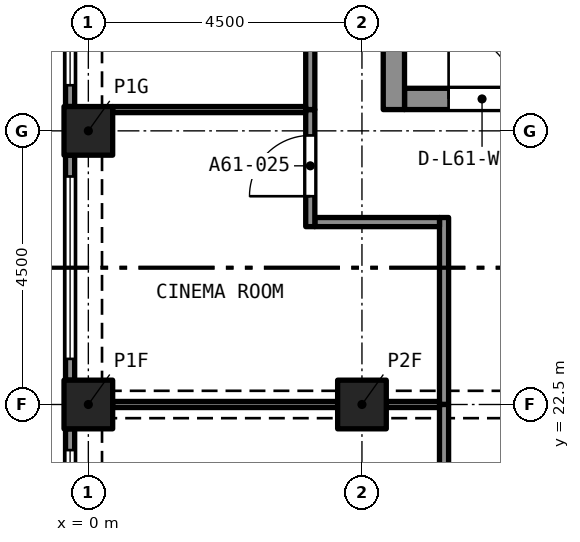
"""IFC4 building model, lengths in metres.
Left out: names, types, materials, properties, quantities, classifications, styles, units other than length and angle.
Written with IfcOpenShell. Run it as: python <this file> out.ifc"""

import sys

from ifc_helpers import new_model, si_unit, direction, frame, frame_2d, origin, origin_2d, place, context, subcontext, project, spatial, rectangle, extrude, element, fill, save


model = new_model("IFC4")
c1 = context("Model", 3, precision=1e-05, world=origin(), true_north=direction((0.0, 1.0)))
c2 = subcontext(c1, "Body", "Model", "MODEL_VIEW")
j1 = project(units=[si_unit("LENGTHUNIT", "METRE"), si_unit("PLANEANGLEUNIT", "RADIAN")], contexts=[c1])
p1 = place(None, origin())
s1 = spatial("IfcSite", under=j1, at=p1, CompositionType="ELEMENT")
p2 = place(p1, origin())
s2 = spatial("IfcBuilding", under=s1, at=p2, CompositionType="ELEMENT")
p3 = place(p2, frame((0.0, 0.0, 219.695)))
s3 = spatial("IfcBuildingStorey", under=s2, at=p3, CompositionType="ELEMENT", Elevation=219.695)
for number, where, z_axis, x_axis in (
    (1, (0.0, 22.5, 0.0), (0.0, 0.0, 1.0), (1.0, 0.0, 0.0)),
    (2, (4.5, 22.5, 0.0), (0.0, 0.0, 1.0), (1.0, 0.0, 0.0)),
    (3, (0.0, 27.0, 0.0), (0.0, 0.0, 1.0), (1.0, 0.0, 0.0)),
):
    element("IfcColumn", number, at=place(p3, frame(where, z_axis=z_axis, x_axis=x_axis)), inside=s3, PredefinedType="COLUMN", context=c2, shape_type="SweptSolid", body=[
        extrude(rectangle(XDim=0.8, YDim=0.8, at=origin_2d()), origin(), (0.0, 0.0, 1.0), 3.2),
    ])
p4 = place(p3, frame((5.2, 27.525, 0.0), z_axis=(0.0, 0.0, 1.0), x_axis=(1.0, 0.0, 0.0)))
e4 = element("IfcWall", 4, at=p4, inside=s3, PredefinedType="SOLIDWALL", context=c2, shape_type="SweptSolid", body=[
    extrude(rectangle(XDim=7.6, YDim=0.35, at=frame_2d((3.8, 0.0))), origin(), (0.0, 0.0, 1.0), 3.2),
])
p5 = place(p4, frame((0.725, 0.0, 0.0)))
e5 = element("IfcOpeningElement", 5, at=p5, cuts=e4, PredefinedType="OPENING", context=c2, shape_type="SweptSolid", body=[
    extrude(rectangle(XDim=1.1, YDim=2.1, at=frame_2d((0.55, 1.05))), frame((0.0, 0.185, 0.0), z_axis=(0.0, -1.0, 0.0), x_axis=(1.0, 0.0, 0.0)), (0.0, 0.0, 1.0), 0.37),
])
p6 = place(p4, frame((3.25, 0.0, 0.0)))
e6 = element("IfcOpeningElement", 6, at=p6, cuts=e4, PredefinedType="OPENING", context=c2, shape_type="SweptSolid", body=[
    extrude(rectangle(XDim=1.1, YDim=2.1, at=frame_2d((0.55, 1.05))), frame((0.0, 0.185, 0.0), z_axis=(0.0, -1.0, 0.0), x_axis=(1.0, 0.0, 0.0)), (0.0, 0.0, 1.0), 0.37),
])
p7 = place(p4, frame((5.775, 0.0, 0.0)))
e7 = element("IfcOpeningElement", 7, at=p7, cuts=e4, PredefinedType="OPENING", context=c2, shape_type="SweptSolid", body=[
    extrude(rectangle(XDim=1.1, YDim=2.1, at=frame_2d((0.55, 1.05))), frame((0.0, 0.185, 0.0), z_axis=(0.0, -1.0, 0.0), x_axis=(1.0, 0.0, 0.0)), (0.0, 0.0, 1.0), 0.37),
])
p8 = place(p3, frame((5.025, 27.35, 0.0), z_axis=(0.0, 0.0, 1.0), x_axis=(0.0, 1.0, 0.0)))
e8 = element("IfcWall", 8, at=p8, inside=s3, PredefinedType="SOLIDWALL", context=c2, shape_type="SweptSolid", body=[
    extrude(rectangle(XDim=12.8, YDim=0.35, at=frame_2d((6.4, 0.0))), origin(), (0.0, 0.0, 1.0), 3.2),
])
p9 = place(p8, frame((8.6, 0.0, 0.0)))
e9 = element("IfcOpeningElement", 9, at=p9, cuts=e8, PredefinedType="OPENING", context=c2, shape_type="SweptSolid", body=[
    extrude(rectangle(XDim=1.2, YDim=2.1, at=frame_2d((0.6, 1.05))), frame((0.0, 0.185, 0.0), z_axis=(0.0, -1.0, 0.0), x_axis=(1.0, 0.0, 0.0)), (0.0, 0.0, 1.0), 0.37),
])
p10 = place(p3, frame((-0.3, 27.4, 0.0), z_axis=(0.0, 0.0, 1.0), x_axis=(0.0, 1.0, 0.0)))
e10 = element("IfcWall", 10, at=p10, inside=s3, PredefinedType="SOLIDWALL", context=c2, shape_type="SweptSolid", body=[
    extrude(rectangle(XDim=3.7, YDim=0.15, at=frame_2d((1.85, 0.0))), origin(), (0.0, 0.0, 1.0), 3.2),
])
p11 = place(p10, frame((0.35, 0.0, 0.45)))
e11 = element("IfcOpeningElement", 11, at=p11, cuts=e10, PredefinedType="OPENING", context=c2, shape_type="SweptSolid", body=[
    extrude(rectangle(XDim=3.0, YDim=1.95, at=frame_2d((1.5, 0.975))), frame((0.0, 0.085, 0.0), z_axis=(0.0, -1.0, 0.0), x_axis=(1.0, 0.0, 0.0)), (0.0, 0.0, 1.0), 0.17),
])
p12 = place(p3, frame((-0.3, 22.9, 0.0), z_axis=(0.0, 0.0, 1.0), x_axis=(0.0, 1.0, 0.0)))
e12 = element("IfcWall", 12, at=p12, inside=s3, PredefinedType="SOLIDWALL", context=c2, shape_type="SweptSolid", body=[
    extrude(rectangle(XDim=3.7, YDim=0.15, at=frame_2d((1.85, 0.0))), origin(), (0.0, 0.0, 1.0), 3.2),
])
p13 = place(p12, frame((0.35, 0.0, 0.45)))
e13 = element("IfcOpeningElement", 13, at=p13, cuts=e12, PredefinedType="OPENING", context=c2, shape_type="SweptSolid", body=[
    extrude(rectangle(XDim=3.0, YDim=1.95, at=frame_2d((1.5, 0.975))), frame((0.0, 0.085, 0.0), z_axis=(0.0, -1.0, 0.0), x_axis=(1.0, 0.0, 0.0)), (0.0, 0.0, 1.0), 0.17),
])
p14 = place(p3, frame((-0.3, 18.4, 0.0), z_axis=(0.0, 0.0, 1.0), x_axis=(0.0, 1.0, 0.0)))
e14 = element("IfcWall", 14, at=p14, inside=s3, PredefinedType="SOLIDWALL", context=c2, shape_type="SweptSolid", body=[
    extrude(rectangle(XDim=3.7, YDim=0.15, at=frame_2d((1.85, 0.0))), origin(), (0.0, 0.0, 1.0), 3.2),
])
p15 = place(p14, frame((0.35, 0.0, 0.45)))
e15 = element("IfcOpeningElement", 15, at=p15, cuts=e14, PredefinedType="OPENING", context=c2, shape_type="SweptSolid", body=[
    extrude(rectangle(XDim=3.0, YDim=1.95, at=frame_2d((1.5, 0.975))), frame((0.0, 0.085, 0.0), z_axis=(0.0, -1.0, 0.0), x_axis=(1.0, 0.0, 0.0)), (0.0, 0.0, 1.0), 0.17),
])
p16 = place(p3, frame((5.85, 22.5, 0.0), z_axis=(0.0, 0.0, 1.0), x_axis=(0.0, 1.0, 0.0)))
e16 = element("IfcWall", 16, at=p16, inside=s3, PredefinedType="PARTITIONING", context=c2, shape_type="SweptSolid", body=[
    extrude(rectangle(XDim=3.075, YDim=0.15, at=frame_2d((1.538, 0.0))), origin(), (0.0, 0.0, 1.0), 2.9),
])
p17 = place(p3, frame((3.725, 25.5, 0.0), z_axis=(0.0, 0.0, 1.0), x_axis=(1.0, 0.0, 0.0)))
e17 = element("IfcWall", 17, at=p17, inside=s3, PredefinedType="PARTITIONING", context=c2, shape_type="SweptSolid", body=[
    extrude(rectangle(XDim=2.05, YDim=0.15, at=frame_2d((1.025, 0.0))), origin(), (0.0, 0.0, 1.0), 2.9),
])
p18 = place(p3, frame((3.65, 25.425, 0.0), z_axis=(0.0, 0.0, 1.0), x_axis=(0.0, 1.0, 0.0)))
e18 = element("IfcWall", 18, at=p18, inside=s3, PredefinedType="PARTITIONING", context=c2, shape_type="SweptSolid", body=[
    extrude(rectangle(XDim=1.925, YDim=0.15, at=frame_2d((0.962, 0.0))), origin(), (0.0, 0.0, 1.0), 2.9),
])
p19 = place(p18, frame((0.5, 0.0, 0.0)))
e19 = element("IfcOpeningElement", 19, at=p19, cuts=e18, PredefinedType="OPENING", context=c2, shape_type="SweptSolid", body=[
    extrude(rectangle(XDim=1.0, YDim=2.1, at=frame_2d((0.5, 1.05))), frame((0.0, 0.085, 0.0), z_axis=(0.0, -1.0, 0.0), x_axis=(1.0, 0.0, 0.0)), (0.0, 0.0, 1.0), 0.17),
])
p20 = place(p3, frame((3.65, 27.35, 0.0), z_axis=(0.0, 0.0, 1.0), x_axis=(0.0, 1.0, 0.0)))
e20 = element("IfcWall", 20, at=p20, inside=s3, PredefinedType="PARTITIONING", context=c2, shape_type="SweptSolid", body=[
    extrude(rectangle(XDim=4.15, YDim=0.15, at=frame_2d((2.075, 0.0))), origin(), (0.0, 0.0, 1.0), 2.9),
])
p21 = place(p20, frame((1.575, 0.0, 0.0)))
e21 = element("IfcOpeningElement", 21, at=p21, cuts=e20, PredefinedType="OPENING", context=c2, shape_type="SweptSolid", body=[
    extrude(rectangle(XDim=1.0, YDim=2.1, at=frame_2d((0.5, 1.05))), frame((0.0, 0.085, 0.0), z_axis=(0.0, -1.0, 0.0), x_axis=(1.0, 0.0, 0.0)), (0.0, 0.0, 1.0), 0.17),
])
p22 = place(p3, frame((5.85, 13.025, 0.0), z_axis=(0.0, 0.0, 1.0), x_axis=(0.0, 1.0, 0.0)))
e22 = element("IfcWall", 22, at=p22, inside=s3, PredefinedType="PARTITIONING", context=c2, shape_type="SweptSolid", body=[
    extrude(rectangle(XDim=9.475, YDim=0.15, at=frame_2d((4.738, 0.0))), origin(), (0.0, 0.0, 1.0), 2.9),
])
p23 = place(p22, frame((4.275, 0.0, 0.0)))
e23 = element("IfcOpeningElement", 23, at=p23, cuts=e22, PredefinedType="OPENING", context=c2, shape_type="SweptSolid", body=[
    extrude(rectangle(XDim=1.0, YDim=2.1, at=frame_2d((0.5, 1.05))), frame((0.0, 0.085, 0.0), z_axis=(0.0, -1.0, 0.0), x_axis=(1.0, 0.0, 0.0)), (0.0, 0.0, 1.0), 0.17),
])
p24 = place(p3, frame((0.4, 27.35, 0.0), z_axis=(0.0, 0.0, 1.0), x_axis=(1.0, 0.0, 0.0)))
e24 = element("IfcWall", 24, at=p24, inside=s3, PredefinedType="PARTITIONING", context=c2, shape_type="SweptSolid", body=[
    extrude(rectangle(XDim=3.175, YDim=0.1, at=frame_2d((1.587, 0.0))), origin(), (0.0, 0.0, 1.0), 2.9),
])
p25 = place(p3, frame((4.9, 22.5, 0.0), z_axis=(0.0, 0.0, 1.0), x_axis=(1.0, 0.0, 0.0)))
e25 = element("IfcWall", 25, at=p25, inside=s3, PredefinedType="PARTITIONING", context=c2, shape_type="SweptSolid", body=[
    extrude(rectangle(XDim=0.875, YDim=0.1, at=frame_2d((0.438, 0.0))), origin(), (0.0, 0.0, 1.0), 2.38),
])
p26 = place(p3, frame((0.4, 22.5, 0.0), z_axis=(0.0, 0.0, 1.0), x_axis=(1.0, 0.0, 0.0)))
e26 = element("IfcWall", 26, at=p26, inside=s3, PredefinedType="PARTITIONING", context=c2, shape_type="SweptSolid", body=[
    extrude(rectangle(XDim=3.7, YDim=0.1, at=frame_2d((1.85, 0.0))), origin(), (0.0, 0.0, 1.0), 2.38),
])
p27 = place(p11, origin())
e27 = element("IfcWindow", 27, at=p27, inside=s3, PartitioningType="SINGLE_PANEL", PredefinedType="WINDOW", context=c2, shape_type="SweptSolid", body=[
    extrude(rectangle(XDim=3.0, YDim=1.95, at=frame_2d((1.5, 0.975))), frame((0.0, 0.03, 0.0), z_axis=(0.0, -1.0, 0.0), x_axis=(1.0, 0.0, 0.0)), (0.0, 0.0, 1.0), 0.06),
])
fill(e11, e27)
p28 = place(p13, origin())
e28 = element("IfcWindow", 28, at=p28, inside=s3, PartitioningType="SINGLE_PANEL", PredefinedType="WINDOW", context=c2, shape_type="SweptSolid", body=[
    extrude(rectangle(XDim=3.0, YDim=1.95, at=frame_2d((1.5, 0.975))), frame((0.0, 0.03, 0.0), z_axis=(0.0, -1.0, 0.0), x_axis=(1.0, 0.0, 0.0)), (0.0, 0.0, 1.0), 0.06),
])
fill(e13, e28)
p29 = place(p15, origin())
e29 = element("IfcWindow", 29, at=p29, inside=s3, PartitioningType="SINGLE_PANEL", PredefinedType="WINDOW", context=c2, shape_type="SweptSolid", body=[
    extrude(rectangle(XDim=3.0, YDim=1.95, at=frame_2d((1.5, 0.975))), frame((0.0, 0.03, 0.0), z_axis=(0.0, -1.0, 0.0), x_axis=(1.0, 0.0, 0.0)), (0.0, 0.0, 1.0), 0.06),
])
fill(e15, e29)
p30 = place(p19, origin())
e30 = element("IfcDoor", 30, at=p30, inside=s3, OperationType="SINGLE_SWING_RIGHT", PredefinedType="DOOR", context=c2, shape_type="SweptSolid", body=[
    extrude(rectangle(XDim=1.0, YDim=2.1, at=frame_2d((0.5, 1.05))), frame((0.0, 0.025, 0.0), z_axis=(0.0, -1.0, 0.0), x_axis=(1.0, 0.0, 0.0)), (0.0, 0.0, 1.0), 0.05),
])
fill(e19, e30)
p31 = place(p5, origin())
e31 = element("IfcDoor", 31, at=p31, inside=s3, OperationType="SINGLE_SWING_LEFT", PredefinedType="DOOR", context=c2, shape_type="SweptSolid", body=[
    extrude(rectangle(XDim=1.1, YDim=2.1, at=frame_2d((0.55, 1.05))), frame((0.0, 0.025, 0.0), z_axis=(0.0, -1.0, 0.0), x_axis=(1.0, 0.0, 0.0)), (0.0, 0.0, 1.0), 0.05),
])
fill(e5, e31)
save(model, sys.argv[1])
